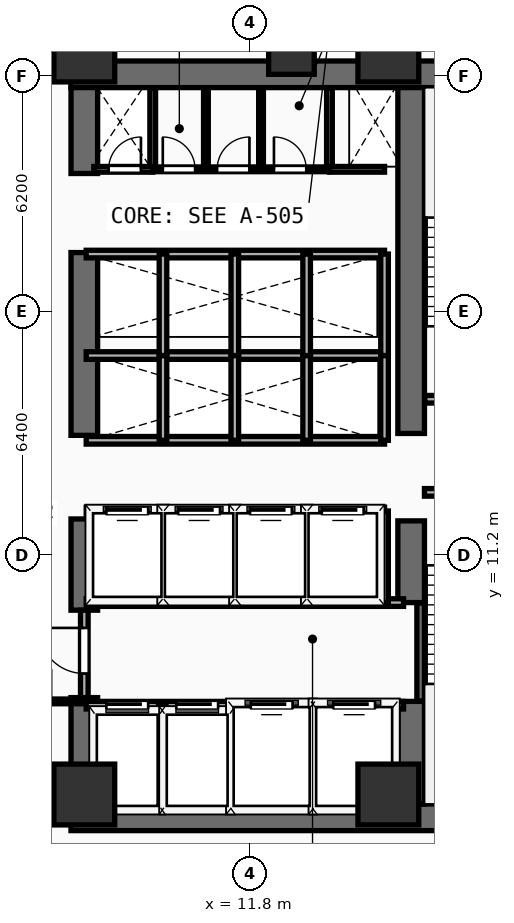
"""IFC4 building model, lengths in metres.
Left out: names, types, materials, properties, quantities, classifications, styles, units other than length and angle.
Written with IfcOpenShell. Run it as: python <this file> out.ifc"""

import sys

from ifc_helpers import new_model, si_unit, direction, frame, frame_2d, origin, origin_2d, place, context, subcontext, project, spatial, rectangle, extrude, element, fill, save


model = new_model("IFC4")
c1 = context("Model", 3, precision=1e-05, world=origin(), true_north=direction((0.0, 1.0)))
c2 = subcontext(c1, "Body", "Model", "MODEL_VIEW")
j1 = project(units=[si_unit("LENGTHUNIT", "METRE"), si_unit("PLANEANGLEUNIT", "RADIAN")], contexts=[c1])
p1 = place(None, origin())
s1 = spatial("IfcSite", under=j1, at=p1, CompositionType="ELEMENT")
p2 = place(p1, origin())
s2 = spatial("IfcBuilding", under=s1, at=p2, CompositionType="ELEMENT")
p3 = place(p2, frame((0.0, 0.0, 48.6)))
s3 = spatial("IfcBuildingStorey", under=s2, at=p3, CompositionType="ELEMENT", Elevation=48.6)
for number, where, z_axis, x_axis in (
    (1, (7.1, 4.3, 0.0), (0.0, 0.0, 1.0), (1.0, 0.0, 0.0)),
    (2, (7.1, 23.85, 0.0), (0.0, 0.0, 1.0), (1.0, 0.0, 0.0)),
):
    element("IfcWall", number, at=place(p3, frame(where, z_axis=z_axis, x_axis=x_axis)), inside=s3, PredefinedType="SHEAR", context=c2, shape_type="SweptSolid", body=[
        extrude(rectangle(XDim=14.05, YDim=0.7, at=frame_2d((7.025, 0.0))), origin(), (0.0, 0.0, 1.0), 3.54),
    ])
p4 = place(p3, frame((7.45, 4.65, 0.0), z_axis=(0.0, 0.0, 1.0), x_axis=(0.0, 1.0, 0.0)))
e3 = element("IfcWall", 3, at=p4, inside=s3, PredefinedType="SHEAR", context=c2, shape_type="SweptSolid", body=[
    extrude(rectangle(XDim=2.8, YDim=0.7, at=frame_2d((1.4, 0.0))), origin(), (0.0, 0.0, 1.0), 3.54),
])
p5 = place(p3, frame((7.45, 9.75, 0.0), z_axis=(0.0, 0.0, 1.0), x_axis=(0.0, 1.0, 0.0)))
e4 = element("IfcWall", 4, at=p5, inside=s3, PredefinedType="SHEAR", context=c2, shape_type="SweptSolid", body=[
    extrude(rectangle(XDim=2.4, YDim=0.7, at=frame_2d((1.2, 0.0))), origin(), (0.0, 0.0, 1.0), 3.54),
])
p6 = place(p3, frame((7.45, 14.35, 0.0), z_axis=(0.0, 0.0, 1.0), x_axis=(0.0, 1.0, 0.0)))
e5 = element("IfcWall", 5, at=p6, inside=s3, PredefinedType="SHEAR", context=c2, shape_type="SweptSolid", body=[
    extrude(rectangle(XDim=4.81, YDim=0.7, at=frame_2d((2.405, 0.0))), origin(), (0.0, 0.0, 1.0), 3.54),
])
p7 = place(p3, frame((7.45, 21.24, 0.0), z_axis=(0.0, 0.0, 1.0), x_axis=(0.0, 1.0, 0.0)))
e6 = element("IfcWall", 6, at=p7, inside=s3, PredefinedType="SHEAR", context=c2, shape_type="SweptSolid", body=[
    extrude(rectangle(XDim=2.26, YDim=0.7, at=frame_2d((1.13, 0.0))), origin(), (0.0, 0.0, 1.0), 3.54),
])
p8 = place(p3, frame((16.05, 4.65, 0.0), z_axis=(0.0, 0.0, 1.0), x_axis=(0.0, 1.0, 0.0)))
e7 = element("IfcWall", 7, at=p8, inside=s3, PredefinedType="SHEAR", context=c2, shape_type="SweptSolid", body=[
    extrude(rectangle(XDim=2.7, YDim=0.7, at=frame_2d((1.35, 0.0))), origin(), (0.0, 0.0, 1.0), 3.54),
])
p9 = place(p3, frame((16.05, 9.95, 0.0), z_axis=(0.0, 0.0, 1.0), x_axis=(0.0, 1.0, 0.0)))
e8 = element("IfcWall", 8, at=p9, inside=s3, PredefinedType="SHEAR", context=c2, shape_type="SweptSolid", body=[
    extrude(rectangle(XDim=2.15, YDim=0.7, at=frame_2d((1.075, 0.0))), origin(), (0.0, 0.0, 1.0), 3.54),
])
p10 = place(p3, frame((16.05, 14.4, 0.0), z_axis=(0.0, 0.0, 1.0), x_axis=(0.0, 1.0, 0.0)))
e9 = element("IfcWall", 9, at=p10, inside=s3, PredefinedType="SHEAR", context=c2, shape_type="SweptSolid", body=[
    extrude(rectangle(XDim=9.1, YDim=0.7, at=frame_2d((4.55, 0.0))), origin(), (0.0, 0.0, 1.0), 3.54),
])
for number, where, z_axis, x_axis in (
    (10, (7.45, 4.9, 0.0), (0.0, 0.0, 1.0), (1.0, 0.0, 0.0)),
    (11, (15.45, 4.9, 0.0), (0.0, 0.0, 1.0), (1.0, 0.0, 0.0)),
    (12, (7.45, 24.45, 0.0), (0.0, 0.0, 1.0), (1.0, 0.0, 0.0)),
    (13, (15.45, 24.45, 0.0), (0.0, 0.0, 1.0), (1.0, 0.0, 0.0)),
):
    element("IfcColumn", number, at=place(p3, frame(where, z_axis=z_axis, x_axis=x_axis)), inside=s3, PredefinedType="COLUMN", context=c2, shape_type="SweptSolid", body=[
        extrude(rectangle(XDim=1.6, YDim=1.6, at=origin_2d()), origin(), (0.0, 0.0, 1.0), 3.54),
    ])
p11 = place(p3, frame((12.9, 24.45, 0.0), z_axis=(0.0, 0.0, 1.0), x_axis=(1.0, 0.0, 0.0)))
e14 = element("IfcColumn", 14, at=p11, inside=s3, PredefinedType="COLUMN", context=c2, shape_type="SweptSolid", body=[
    extrude(rectangle(XDim=1.2, YDim=1.2, at=origin_2d()), origin(), (0.0, 0.0, 1.0), 3.54),
])
p12 = place(p3, frame((16.3, 7.36, 0.0), z_axis=(0.0, 0.0, 1.0), x_axis=(0.0, 1.0, 0.0)))
e15 = element("IfcWall", 15, at=p12, inside=s3, PredefinedType="SHEAR", context=c2, shape_type="SweptSolid", body=[
    extrude(rectangle(XDim=2.58, YDim=0.2, at=frame_2d((1.29, 0.0))), origin(), (0.0, 0.0, 1.0), 3.54),
])
p13 = place(p3, frame((16.4, 12.85, 0.0), z_axis=(0.0, 0.0, 1.0), x_axis=(1.0, 0.0, 0.0)))
e16 = element("IfcWall", 16, at=p13, inside=s3, PredefinedType="PARTITIONING", context=c2, shape_type="SweptSolid", body=[
    extrude(rectangle(XDim=3.96, YDim=0.2, at=frame_2d((1.98, 0.0))), origin(), (0.0, 0.0, 1.0), 3.54),
])
p14 = place(p13, frame((1.304, 0.0, 0.0)))
e17 = element("IfcOpeningElement", 17, at=p14, cuts=e16, PredefinedType="OPENING", context=c2, shape_type="SweptSolid", body=[
    extrude(rectangle(XDim=1.1, YDim=2.2, at=frame_2d((0.55, 1.1))), frame((0.0, 0.11, 0.0), z_axis=(0.0, -1.0, 0.0), x_axis=(1.0, 0.0, 0.0)), (0.0, 0.0, 1.0), 0.22),
])
p15 = place(p3, frame((16.41, 15.3, 0.0), z_axis=(0.0, 0.0, 1.0), x_axis=(1.0, 0.0, 0.0)))
e18 = element("IfcWall", 18, at=p15, inside=s3, PredefinedType="PARTITIONING", context=c2, shape_type="SweptSolid", body=[
    extrude(rectangle(XDim=3.95, YDim=0.2, at=frame_2d((1.975, 0.0))), origin(), (0.0, 0.0, 1.0), 3.54),
])
p16 = place(p15, frame((1.294, 0.0, 0.0)))
e19 = element("IfcOpeningElement", 19, at=p16, cuts=e18, PredefinedType="OPENING", context=c2, shape_type="SweptSolid", body=[
    extrude(rectangle(XDim=1.1, YDim=2.2, at=frame_2d((0.55, 1.1))), frame((0.0, 0.11, 0.0), z_axis=(0.0, -1.0, 0.0), x_axis=(1.0, 0.0, 0.0)), (0.0, 0.0, 1.0), 0.22),
])
p17 = place(p3, frame((7.5, 7.25, 0.0), z_axis=(0.0, 0.0, 1.0), x_axis=(1.0, 0.0, 0.0)))
e20 = element("IfcWall", 20, at=p17, inside=s3, PredefinedType="PARTITIONING", context=c2, shape_type="SweptSolid", body=[
    extrude(rectangle(XDim=8.35, YDim=0.2, at=frame_2d((4.175, 0.0))), origin(), (0.0, 0.0, 1.0), 3.54),
])
p18 = place(p17, frame((0.53, 0.0, 0.0)))
e21 = element("IfcOpeningElement", 21, at=p18, cuts=e20, PredefinedType="OPENING", context=c2, shape_type="SweptSolid", body=[
    extrude(rectangle(XDim=1.1, YDim=2.2, at=frame_2d((0.55, 1.1))), frame((0.0, 0.11, 0.0), z_axis=(0.0, -1.0, 0.0), x_axis=(1.0, 0.0, 0.0)), (0.0, 0.0, 1.0), 0.22),
])
p19 = place(p17, frame((2.37, 0.0, 0.0)))
e22 = element("IfcOpeningElement", 22, at=p19, cuts=e20, PredefinedType="OPENING", context=c2, shape_type="SweptSolid", body=[
    extrude(rectangle(XDim=1.1, YDim=2.2, at=frame_2d((0.55, 1.1))), frame((0.0, 0.11, 0.0), z_axis=(0.0, -1.0, 0.0), x_axis=(1.0, 0.0, 0.0)), (0.0, 0.0, 1.0), 0.22),
])
p20 = place(p17, frame((4.33, 0.0, 0.0)))
e23 = element("IfcOpeningElement", 23, at=p20, cuts=e20, PredefinedType="OPENING", context=c2, shape_type="SweptSolid", body=[
    extrude(rectangle(XDim=1.1, YDim=2.2, at=frame_2d((0.55, 1.1))), frame((0.0, 0.11, 0.0), z_axis=(0.0, -1.0, 0.0), x_axis=(1.0, 0.0, 0.0)), (0.0, 0.0, 1.0), 0.22),
])
p21 = place(p17, frame((6.5, 0.0, 0.0)))
e24 = element("IfcOpeningElement", 24, at=p21, cuts=e20, PredefinedType="OPENING", context=c2, shape_type="SweptSolid", body=[
    extrude(rectangle(XDim=1.1, YDim=2.2, at=frame_2d((0.55, 1.1))), frame((0.0, 0.11, 0.0), z_axis=(0.0, -1.0, 0.0), x_axis=(1.0, 0.0, 0.0)), (0.0, 0.0, 1.0), 0.22),
])
p22 = place(p3, frame((7.5, 9.95, 0.0), z_axis=(0.0, 0.0, 1.0), x_axis=(1.0, 0.0, 0.0)))
e25 = element("IfcWall", 25, at=p22, inside=s3, PredefinedType="PARTITIONING", context=c2, shape_type="SweptSolid", body=[
    extrude(rectangle(XDim=8.35, YDim=0.2, at=frame_2d((4.175, 0.0))), origin(), (0.0, 0.0, 1.0), 3.54),
])
for number, where, z_axis, x_axis in (
    (26, (9.5, 4.45, 0.0), (0.0, 0.0, 1.0), (0.0, 1.0, 0.0)),
    (27, (11.36, 4.45, 0.0), (0.0, 0.0, 1.0), (0.0, 1.0, 0.0)),
    (28, (13.46, 4.45, 0.0), (0.0, 0.0, 1.0), (0.0, 1.0, 0.0)),
):
    element("IfcWall", number, at=place(p3, frame(where, z_axis=z_axis, x_axis=x_axis)), inside=s3, PredefinedType="PARTITIONING", context=c2, shape_type="SweptSolid", body=[
        extrude(rectangle(XDim=2.8, YDim=0.2, at=frame_2d((1.4, 0.0))), origin(), (0.0, 0.0, 1.0), 3.54),
    ])
p23 = place(p3, frame((7.45, 7.45, 0.0), z_axis=(0.0, 0.0, 1.0), x_axis=(0.0, 1.0, 0.0)))
e29 = element("IfcWall", 29, at=p23, inside=s3, PredefinedType="PARTITIONING", context=c2, shape_type="SweptSolid", body=[
    extrude(rectangle(XDim=2.3, YDim=0.2, at=frame_2d((1.15, 0.0))), origin(), (0.0, 0.0, 1.0), 2.52),
])
p24 = place(p23, frame((0.633, 0.0, 0.0)))
e30 = element("IfcOpeningElement", 30, at=p24, cuts=e29, PredefinedType="OPENING", context=c2, shape_type="SweptSolid", body=[
    extrude(rectangle(XDim=1.2, YDim=2.25, at=frame_2d((0.6, 1.125))), frame((0.0, 0.11, 0.0), z_axis=(0.0, -1.0, 0.0), x_axis=(1.0, 0.0, 0.0)), (0.0, 0.0, 1.0), 0.22),
])
p25 = place(p3, frame((7.5, 12.36, 0.0), z_axis=(0.0, 0.0, 1.0), x_axis=(1.0, 0.0, 0.0)))
e31 = element("IfcWall", 31, at=p25, inside=s3, PredefinedType="PARTITIONING", context=c2, shape_type="SweptSolid", body=[
    extrude(rectangle(XDim=7.85, YDim=0.2, at=frame_2d((3.925, 0.0))), origin(), (0.0, 0.0, 1.0), 3.54),
])
p26 = place(p25, frame((0.53, 0.0, 0.0)))
e32 = element("IfcOpeningElement", 32, at=p26, cuts=e31, PredefinedType="OPENING", context=c2, shape_type="SweptSolid", body=[
    extrude(rectangle(XDim=1.1, YDim=2.2, at=frame_2d((0.55, 1.1))), frame((0.0, 0.11, 0.0), z_axis=(0.0, -1.0, 0.0), x_axis=(1.0, 0.0, 0.0)), (0.0, 0.0, 1.0), 0.22),
])
p27 = place(p25, frame((2.42, 0.0, 0.0)))
e33 = element("IfcOpeningElement", 33, at=p27, cuts=e31, PredefinedType="OPENING", context=c2, shape_type="SweptSolid", body=[
    extrude(rectangle(XDim=1.1, YDim=2.2, at=frame_2d((0.55, 1.1))), frame((0.0, 0.11, 0.0), z_axis=(0.0, -1.0, 0.0), x_axis=(1.0, 0.0, 0.0)), (0.0, 0.0, 1.0), 0.22),
])
p28 = place(p25, frame((4.31, 0.0, 0.0)))
e34 = element("IfcOpeningElement", 34, at=p28, cuts=e31, PredefinedType="OPENING", context=c2, shape_type="SweptSolid", body=[
    extrude(rectangle(XDim=1.1, YDim=2.2, at=frame_2d((0.55, 1.1))), frame((0.0, 0.11, 0.0), z_axis=(0.0, -1.0, 0.0), x_axis=(1.0, 0.0, 0.0)), (0.0, 0.0, 1.0), 0.22),
])
p29 = place(p25, frame((6.2, 0.0, 0.0)))
e35 = element("IfcOpeningElement", 35, at=p29, cuts=e31, PredefinedType="OPENING", context=c2, shape_type="SweptSolid", body=[
    extrude(rectangle(XDim=1.1, YDim=2.2, at=frame_2d((0.55, 1.1))), frame((0.0, 0.11, 0.0), z_axis=(0.0, -1.0, 0.0), x_axis=(1.0, 0.0, 0.0)), (0.0, 0.0, 1.0), 0.22),
])
for number, where, z_axis, x_axis in (
    (36, (15.35, 9.95, 0.0), (0.0, 0.0, 1.0), (0.0, 1.0, 0.0)),
    (37, (9.52, 9.95, 0.0), (0.0, 0.0, 1.0), (0.0, 1.0, 0.0)),
    (38, (11.41, 9.95, 0.0), (0.0, 0.0, 1.0), (0.0, 1.0, 0.0)),
    (39, (13.3, 9.95, 0.0), (0.0, 0.0, 1.0), (0.0, 1.0, 0.0)),
):
    element("IfcWall", number, at=place(p3, frame(where, z_axis=z_axis, x_axis=x_axis)), inside=s3, PredefinedType="PARTITIONING", context=c2, shape_type="SweptSolid", body=[
        extrude(rectangle(XDim=2.41, YDim=0.2, at=frame_2d((1.205, 0.0))), origin(), (0.0, 0.0, 1.0), 3.54),
    ])
for number, where, z_axis, x_axis in (
    (40, (7.5, 14.22, 0.0), (0.0, 0.0, 1.0), (1.0, 0.0, 0.0)),
    (41, (7.5, 16.45, 0.0), (0.0, 0.0, 1.0), (1.0, 0.0, 0.0)),
):
    element("IfcWall", number, at=place(p3, frame(where, z_axis=z_axis, x_axis=x_axis)), inside=s3, PredefinedType="PARTITIONING", context=c2, shape_type="SweptSolid", body=[
        extrude(rectangle(XDim=7.85, YDim=0.2, at=frame_2d((3.925, 0.0))), origin(), (0.0, 0.0, 1.0), 3.54),
    ])
for number, where, z_axis, x_axis in (
    (42, (15.35, 14.22, 0.0), (0.0, 0.0, 1.0), (0.0, 1.0, 0.0)),
    (43, (9.52, 14.22, 0.0), (0.0, 0.0, 1.0), (0.0, 1.0, 0.0)),
    (44, (11.41, 14.22, 0.0), (0.0, 0.0, 1.0), (0.0, 1.0, 0.0)),
    (45, (13.3, 14.22, 0.0), (0.0, 0.0, 1.0), (0.0, 1.0, 0.0)),
):
    element("IfcWall", number, at=place(p3, frame(where, z_axis=z_axis, x_axis=x_axis)), inside=s3, PredefinedType="PARTITIONING", context=c2, shape_type="SweptSolid", body=[
        extrude(rectangle(XDim=2.23, YDim=0.2, at=frame_2d((1.115, 0.0))), origin(), (0.0, 0.0, 1.0), 3.54),
    ])
p30 = place(p3, frame((7.5, 19.12, 0.0), z_axis=(0.0, 0.0, 1.0), x_axis=(1.0, 0.0, 0.0)))
e46 = element("IfcWall", 46, at=p30, inside=s3, PredefinedType="PARTITIONING", context=c2, shape_type="SweptSolid", body=[
    extrude(rectangle(XDim=7.85, YDim=0.2, at=frame_2d((3.925, 0.0))), origin(), (0.0, 0.0, 1.0), 3.54),
])
for number, where, z_axis, x_axis in (
    (47, (15.35, 16.45, 0.0), (0.0, 0.0, 1.0), (0.0, 1.0, 0.0)),
    (48, (9.52, 16.45, 0.0), (0.0, 0.0, 1.0), (0.0, 1.0, 0.0)),
    (49, (11.41, 16.45, 0.0), (0.0, 0.0, 1.0), (0.0, 1.0, 0.0)),
    (50, (13.3, 16.45, 0.0), (0.0, 0.0, 1.0), (0.0, 1.0, 0.0)),
):
    element("IfcWall", number, at=place(p3, frame(where, z_axis=z_axis, x_axis=x_axis)), inside=s3, PredefinedType="PARTITIONING", context=c2, shape_type="SweptSolid", body=[
        extrude(rectangle(XDim=2.67, YDim=0.2, at=frame_2d((1.335, 0.0))), origin(), (0.0, 0.0, 1.0), 3.54),
    ])
for number, where, z_axis, x_axis in (
    (51, (9.25, 21.35, 0.0), (0.0, 0.0, 1.0), (0.0, 1.0, 0.0)),
    (52, (13.9, 21.35, 0.0), (0.0, 0.0, 1.0), (0.0, 1.0, 0.0)),
):
    element("IfcWall", number, at=place(p3, frame(where, z_axis=z_axis, x_axis=x_axis)), inside=s3, PredefinedType="PARTITIONING", context=c2, shape_type="SweptSolid", body=[
        extrude(rectangle(XDim=2.13, YDim=0.15, at=frame_2d((1.065, 0.0))), origin(), (0.0, 0.0, 1.0), 3.54),
    ])
p31 = place(p3, frame((7.7, 21.35, 0.0), z_axis=(0.0, 0.0, 1.0), x_axis=(1.0, 0.0, 0.0)))
e53 = element("IfcWall", 53, at=p31, inside=s3, PredefinedType="PARTITIONING", context=c2, shape_type="SweptSolid", body=[
    extrude(rectangle(XDim=1.55, YDim=0.15, at=frame_2d((0.775, 0.0))), origin(), (0.0, 0.0, 1.0), 3.54),
])
p32 = place(p31, frame((0.39, 0.0, 0.0)))
e54 = element("IfcOpeningElement", 54, at=p32, cuts=e53, PredefinedType="OPENING", context=c2, shape_type="SweptSolid", body=[
    extrude(rectangle(XDim=0.85, YDim=2.15, at=frame_2d((0.425, 1.075))), frame((0.0, 0.085, 0.0), z_axis=(0.0, -1.0, 0.0), x_axis=(1.0, 0.0, 0.0)), (0.0, 0.0, 1.0), 0.17),
])
p33 = place(p3, frame((13.9, 21.35, 0.0), z_axis=(0.0, 0.0, 1.0), x_axis=(1.0, 0.0, 0.0)))
e55 = element("IfcWall", 55, at=p33, inside=s3, PredefinedType="PARTITIONING", context=c2, shape_type="SweptSolid", body=[
    extrude(rectangle(XDim=1.45, YDim=0.15, at=frame_2d((0.725, 0.0))), origin(), (0.0, 0.0, 1.0), 3.54),
])
p34 = place(p3, frame((9.25, 21.35, 0.0), z_axis=(0.0, 0.0, 1.0), x_axis=(1.0, 0.0, 0.0)))
e56 = element("IfcWall", 56, at=p34, inside=s3, PredefinedType="PARTITIONING", context=c2, shape_type="SweptSolid", body=[
    extrude(rectangle(XDim=4.65, YDim=0.125, at=frame_2d((2.325, 0.0))), origin(), (0.0, 0.0, 1.0), 3.54),
])
p35 = place(p34, frame((0.265, 0.0, 0.0)))
e57 = element("IfcOpeningElement", 57, at=p35, cuts=e56, PredefinedType="OPENING", context=c2, shape_type="SweptSolid", body=[
    extrude(rectangle(XDim=0.85, YDim=2.15, at=frame_2d((0.425, 1.075))), frame((0.0, 0.073, 0.0), z_axis=(0.0, -1.0, 0.0), x_axis=(1.0, 0.0, 0.0)), (0.0, 0.0, 1.0), 0.145),
])
p36 = place(p34, frame((1.695, 0.0, 0.0)))
e58 = element("IfcOpeningElement", 58, at=p36, cuts=e56, PredefinedType="OPENING", context=c2, shape_type="SweptSolid", body=[
    extrude(rectangle(XDim=0.85, YDim=2.15, at=frame_2d((0.425, 1.075))), frame((0.0, 0.073, 0.0), z_axis=(0.0, -1.0, 0.0), x_axis=(1.0, 0.0, 0.0)), (0.0, 0.0, 1.0), 0.145),
])
p37 = place(p34, frame((3.19, 0.0, 0.0)))
e59 = element("IfcOpeningElement", 59, at=p37, cuts=e56, PredefinedType="OPENING", context=c2, shape_type="SweptSolid", body=[
    extrude(rectangle(XDim=0.85, YDim=2.15, at=frame_2d((0.425, 1.075))), frame((0.0, 0.073, 0.0), z_axis=(0.0, -1.0, 0.0), x_axis=(1.0, 0.0, 0.0)), (0.0, 0.0, 1.0), 0.145),
])
for number, where, z_axis, x_axis in (
    (60, (10.65, 21.35, 0.0), (0.0, 0.0, 1.0), (0.0, 1.0, 0.0)),
    (61, (12.1, 21.35, 0.0), (0.0, 0.0, 1.0), (0.0, 1.0, 0.0)),
):
    element("IfcWall", number, at=place(p3, frame(where, z_axis=z_axis, x_axis=x_axis)), inside=s3, PredefinedType="PARTITIONING", context=c2, shape_type="SweptSolid", body=[
        extrude(rectangle(XDim=2.1, YDim=0.125, at=frame_2d((1.05, 0.0))), origin(), (0.0, 0.0, 1.0), 3.54),
    ])
p38 = place(p3, frame((1.64, 7.35, 0.0), z_axis=(0.0, 0.0, 1.0), x_axis=(1.0, 0.0, 0.0)))
e62 = element("IfcWall", 62, at=p38, inside=s3, PredefinedType="PARTITIONING", context=c2, shape_type="SweptSolid", body=[
    extrude(rectangle(XDim=5.76, YDim=0.125, at=frame_2d((2.88, 0.0))), origin(), (0.0, 0.0, 1.0), 3.54),
])
p39 = place(p38, frame((4.087, 0.0, 0.0)))
e63 = element("IfcOpeningElement", 63, at=p39, cuts=e62, PredefinedType="OPENING", context=c2, shape_type="SweptSolid", body=[
    extrude(rectangle(XDim=0.85, YDim=2.15, at=frame_2d((0.425, 1.075))), frame((0.0, 0.073, 0.0), z_axis=(0.0, -1.0, 0.0), x_axis=(1.0, 0.0, 0.0)), (0.0, 0.0, 1.0), 0.145),
])
p40 = place(p18, origin())
e64 = element("IfcDoor", 64, at=p40, inside=s3, OperationType="SLIDING_TO_LEFT", PredefinedType="DOOR", context=c2, shape_type="SweptSolid", body=[
    extrude(rectangle(XDim=1.1, YDim=2.2, at=frame_2d((0.55, 1.1))), frame((0.0, 0.025, 0.0), z_axis=(0.0, -1.0, 0.0), x_axis=(1.0, 0.0, 0.0)), (0.0, 0.0, 1.0), 0.05),
])
fill(e21, e64)
p41 = place(p19, origin())
e65 = element("IfcDoor", 65, at=p41, inside=s3, OperationType="SLIDING_TO_LEFT", PredefinedType="DOOR", context=c2, shape_type="SweptSolid", body=[
    extrude(rectangle(XDim=1.1, YDim=2.2, at=frame_2d((0.55, 1.1))), frame((0.0, 0.025, 0.0), z_axis=(0.0, -1.0, 0.0), x_axis=(1.0, 0.0, 0.0)), (0.0, 0.0, 1.0), 0.05),
])
fill(e22, e65)
p42 = place(p20, origin())
e66 = element("IfcDoor", 66, at=p42, inside=s3, OperationType="SLIDING_TO_LEFT", PredefinedType="DOOR", context=c2, shape_type="SweptSolid", body=[
    extrude(rectangle(XDim=1.1, YDim=2.2, at=frame_2d((0.55, 1.1))), frame((0.0, 0.025, 0.0), z_axis=(0.0, -1.0, 0.0), x_axis=(1.0, 0.0, 0.0)), (0.0, 0.0, 1.0), 0.05),
])
fill(e23, e66)
p43 = place(p21, origin())
e67 = element("IfcDoor", 67, at=p43, inside=s3, OperationType="SLIDING_TO_LEFT", PredefinedType="DOOR", context=c2, shape_type="SweptSolid", body=[
    extrude(rectangle(XDim=1.1, YDim=2.2, at=frame_2d((0.55, 1.1))), frame((0.0, 0.025, 0.0), z_axis=(0.0, -1.0, 0.0), x_axis=(1.0, 0.0, 0.0)), (0.0, 0.0, 1.0), 0.05),
])
fill(e24, e67)
p44 = place(p24, frame((1.2, 0.0, 0.0), z_axis=(0.0, 0.0, 1.0), x_axis=(-1.0, 0.0, 0.0)))
e68 = element("IfcDoor", 68, at=p44, inside=s3, OperationType="SINGLE_SWING_LEFT", PredefinedType="DOOR", context=c2, shape_type="SweptSolid", body=[
    extrude(rectangle(XDim=1.2, YDim=2.25, at=frame_2d((0.6, 1.125))), frame((0.0, 0.025, 0.0), z_axis=(0.0, -1.0, 0.0), x_axis=(1.0, 0.0, 0.0)), (0.0, 0.0, 1.0), 0.05),
])
fill(e30, e68)
p45 = place(p26, origin())
e69 = element("IfcDoor", 69, at=p45, inside=s3, OperationType="SLIDING_TO_LEFT", PredefinedType="DOOR", context=c2, shape_type="SweptSolid", body=[
    extrude(rectangle(XDim=1.1, YDim=2.2, at=frame_2d((0.55, 1.1))), frame((0.0, 0.025, 0.0), z_axis=(0.0, -1.0, 0.0), x_axis=(1.0, 0.0, 0.0)), (0.0, 0.0, 1.0), 0.05),
])
fill(e32, e69)
p46 = place(p27, origin())
e70 = element("IfcDoor", 70, at=p46, inside=s3, OperationType="SLIDING_TO_LEFT", PredefinedType="DOOR", context=c2, shape_type="SweptSolid", body=[
    extrude(rectangle(XDim=1.1, YDim=2.2, at=frame_2d((0.55, 1.1))), frame((0.0, 0.025, 0.0), z_axis=(0.0, -1.0, 0.0), x_axis=(1.0, 0.0, 0.0)), (0.0, 0.0, 1.0), 0.05),
])
fill(e33, e70)
p47 = place(p28, origin())
e71 = element("IfcDoor", 71, at=p47, inside=s3, OperationType="SLIDING_TO_LEFT", PredefinedType="DOOR", context=c2, shape_type="SweptSolid", body=[
    extrude(rectangle(XDim=1.1, YDim=2.2, at=frame_2d((0.55, 1.1))), frame((0.0, 0.025, 0.0), z_axis=(0.0, -1.0, 0.0), x_axis=(1.0, 0.0, 0.0)), (0.0, 0.0, 1.0), 0.05),
])
fill(e34, e71)
p48 = place(p29, origin())
e72 = element("IfcDoor", 72, at=p48, inside=s3, OperationType="SLIDING_TO_LEFT", PredefinedType="DOOR", context=c2, shape_type="SweptSolid", body=[
    extrude(rectangle(XDim=1.1, YDim=2.2, at=frame_2d((0.55, 1.1))), frame((0.0, 0.025, 0.0), z_axis=(0.0, -1.0, 0.0), x_axis=(1.0, 0.0, 0.0)), (0.0, 0.0, 1.0), 0.05),
])
fill(e35, e72)
p49 = place(p32, origin())
e73 = element("IfcDoor", 73, at=p49, inside=s3, OperationType="SINGLE_SWING_RIGHT", PredefinedType="DOOR", context=c2, shape_type="SweptSolid", body=[
    extrude(rectangle(XDim=0.85, YDim=2.15, at=frame_2d((0.425, 1.075))), frame((0.0, 0.025, 0.0), z_axis=(0.0, -1.0, 0.0), x_axis=(1.0, 0.0, 0.0)), (0.0, 0.0, 1.0), 0.05),
])
fill(e54, e73)
p50 = place(p35, origin())
e74 = element("IfcDoor", 74, at=p50, inside=s3, OperationType="SINGLE_SWING_LEFT", PredefinedType="DOOR", context=c2, shape_type="SweptSolid", body=[
    extrude(rectangle(XDim=0.85, YDim=2.15, at=frame_2d((0.425, 1.075))), frame((0.0, 0.025, 0.0), z_axis=(0.0, -1.0, 0.0), x_axis=(1.0, 0.0, 0.0)), (0.0, 0.0, 1.0), 0.05),
])
fill(e57, e74)
p51 = place(p36, origin())
e75 = element("IfcDoor", 75, at=p51, inside=s3, OperationType="SINGLE_SWING_RIGHT", PredefinedType="DOOR", context=c2, shape_type="SweptSolid", body=[
    extrude(rectangle(XDim=0.85, YDim=2.15, at=frame_2d((0.425, 1.075))), frame((0.0, 0.025, 0.0), z_axis=(0.0, -1.0, 0.0), x_axis=(1.0, 0.0, 0.0)), (0.0, 0.0, 1.0), 0.05),
])
fill(e58, e75)
p52 = place(p37, origin())
e76 = element("IfcDoor", 76, at=p52, inside=s3, OperationType="SINGLE_SWING_LEFT", PredefinedType="DOOR", context=c2, shape_type="SweptSolid", body=[
    extrude(rectangle(XDim=0.85, YDim=2.15, at=frame_2d((0.425, 1.075))), frame((0.0, 0.025, 0.0), z_axis=(0.0, -1.0, 0.0), x_axis=(1.0, 0.0, 0.0)), (0.0, 0.0, 1.0), 0.05),
])
fill(e59, e76)
save(model, sys.argv[1])
